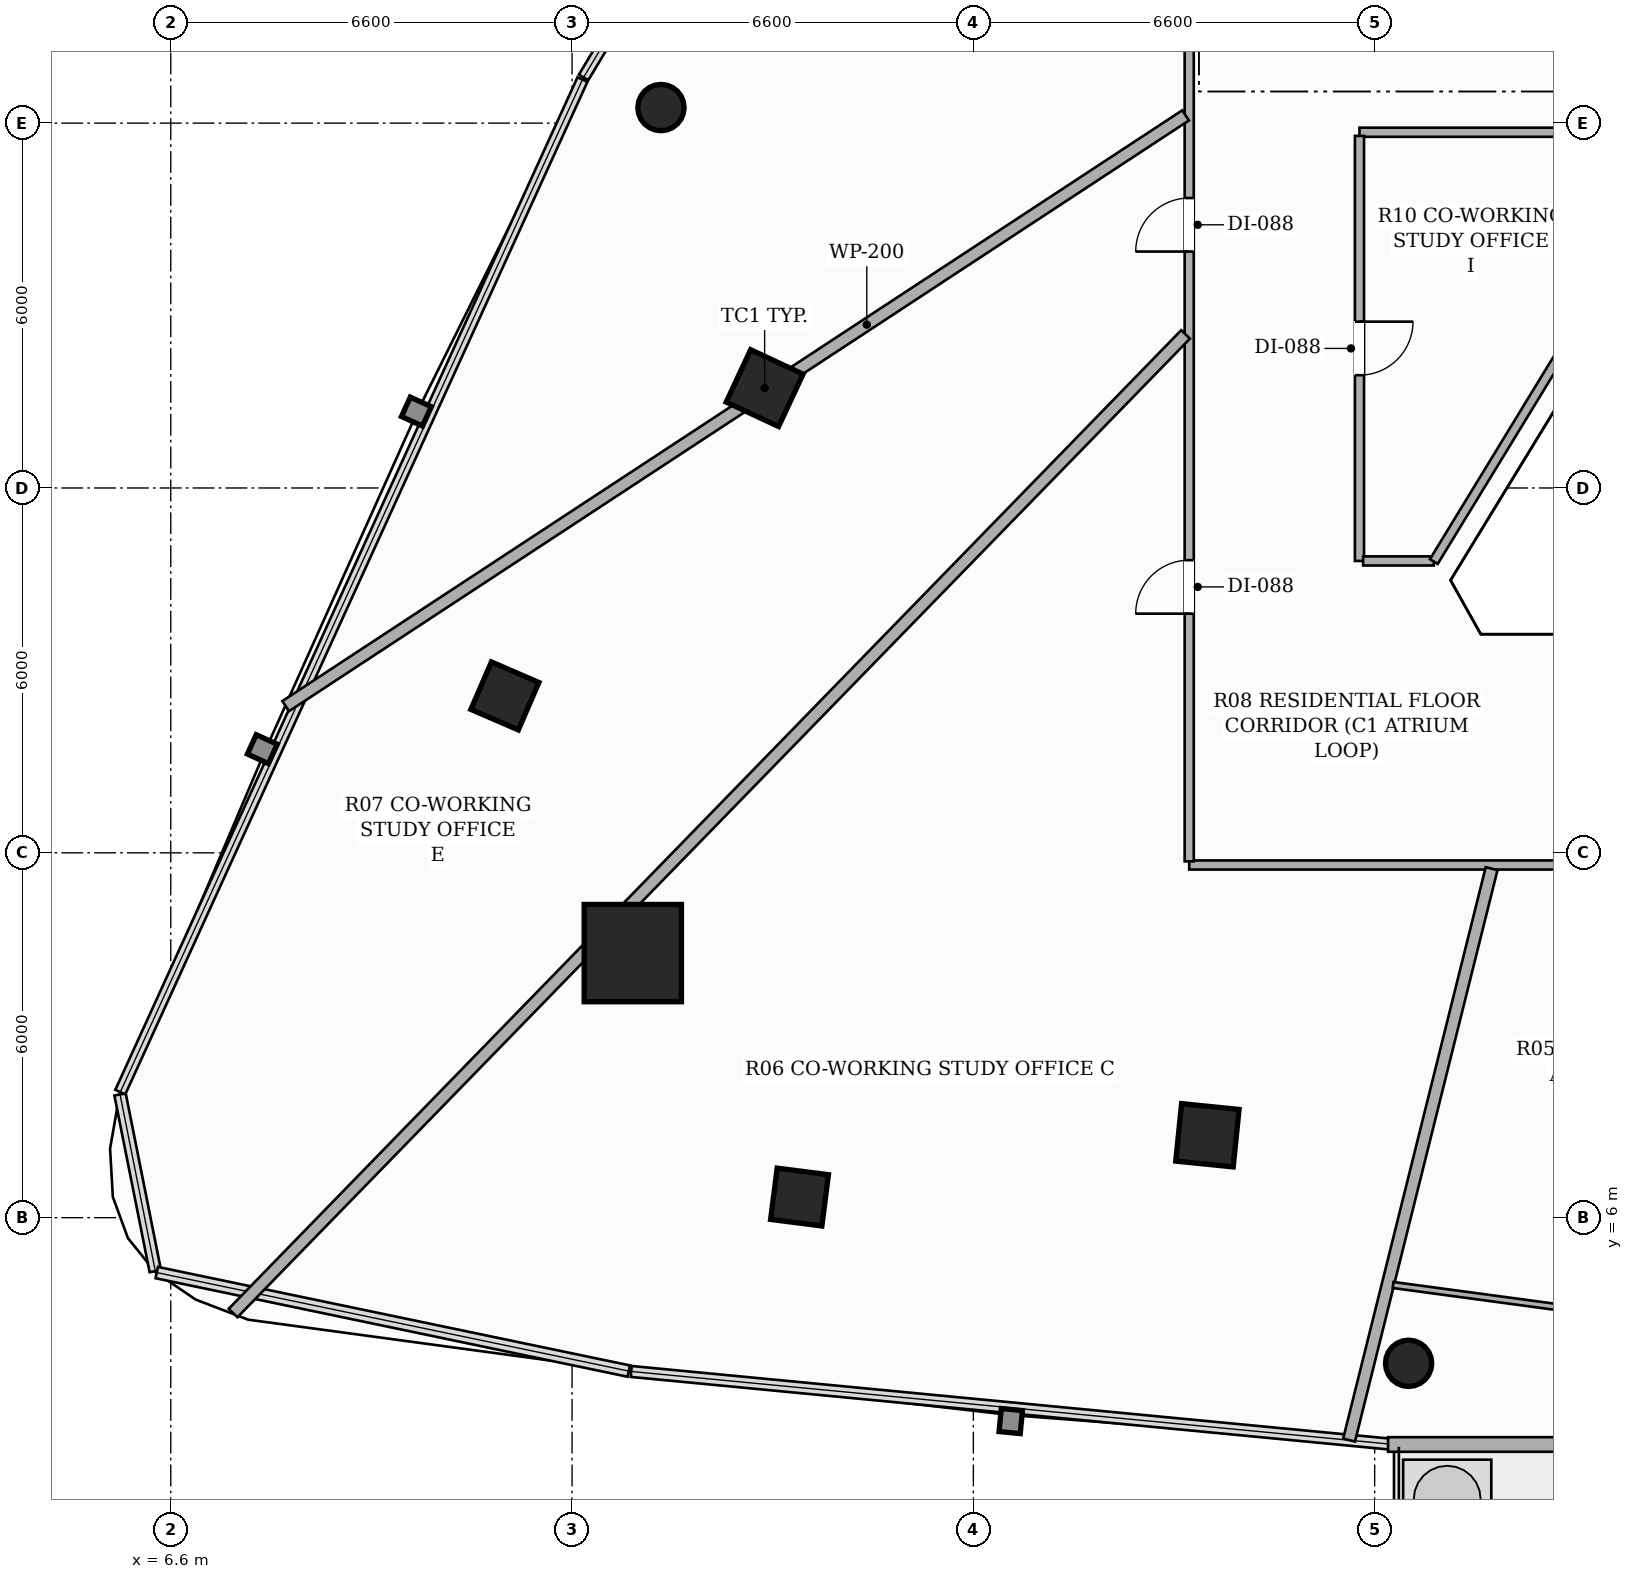
"""IFC4 building model, lengths in metres.
Left out: names, types, materials, properties, quantities, classifications, styles, units other than length and angle.
Written with IfcOpenShell. Run it as: python <this file> out.ifc"""

import sys

from ifc_helpers import new_model, si_unit, direction, frame, frame_2d, origin, origin_2d, place, context, subcontext, project, spatial, rectangle, hollow_rectangle, hollow_circle, extrude, element, fill, save


model = new_model("IFC4")
c1 = context("Model", 3, precision=1e-05, world=origin(), true_north=direction((0.0, 1.0)))
c2 = subcontext(c1, "Body", "Model", "MODEL_VIEW")
j1 = project(units=[si_unit("LENGTHUNIT", "METRE"), si_unit("PLANEANGLEUNIT", "RADIAN")], contexts=[c1])
p1 = place(None, origin())
s1 = spatial("IfcSite", under=j1, at=p1, CompositionType="ELEMENT")
p2 = place(p1, origin())
s2 = spatial("IfcBuilding", under=s1, at=p2, CompositionType="ELEMENT")
p3 = place(p2, frame((0.0, 0.0, 87.35)))
s3 = spatial("IfcBuildingStorey", under=s2, at=p3, CompositionType="ELEMENT", Elevation=87.35)
p4 = place(p3, frame((14.199, 10.351, 0.0), z_axis=(0.0, 0.0, 1.0), x_axis=(1.0, 0.0, 0.0)))
e1 = element("IfcColumn", 1, at=p4, inside=s3, PredefinedType="COLUMN", context=c2, shape_type="SweptSolid", body=[
    extrude(hollow_rectangle(XDim=1.6, YDim=1.6, WallThickness=0.05, at=origin_2d()), origin(), (0.0, 0.0, 1.0), 3.3),
])
for number, where, z_axis, x_axis in (
    (2, (16.367, 19.642, 0.0), (0.0, 0.0, 1.0), (0.423, 0.906, 0.0)),
    (3, (23.649, 7.355, 0.0), (0.0, 0.0, 1.0), (-0.995, 0.101, 0.0)),
):
    element("IfcColumn", number, at=place(p3, frame(where, z_axis=z_axis, x_axis=x_axis)), inside=s3, PredefinedType="COLUMN", context=c2, shape_type="SweptSolid", body=[
        extrude(hollow_rectangle(XDim=0.95, YDim=0.95, WallThickness=0.032, at=origin_2d()), origin(), (0.0, 0.0, 1.0), 3.3),
    ])
for number, where, z_axis, x_axis in (
    (4, (12.095, 14.58, 0.0), (0.0, 0.0, 1.0), (0.397, 0.918, 0.0)),
    (5, (16.941, 6.339, 0.0), (0.0, 0.0, 1.0), (-0.992, 0.127, 0.0)),
):
    element("IfcColumn", number, at=place(p3, frame(where, z_axis=z_axis, x_axis=x_axis)), inside=s3, PredefinedType="COLUMN", context=c2, shape_type="SweptSolid", body=[
        extrude(hollow_rectangle(XDim=0.85, YDim=0.85, WallThickness=0.028, at=origin_2d()), origin(), (0.0, 0.0, 1.0), 3.3),
    ])
for number, where, z_axis, x_axis in (
    (6, (14.662, 24.256, 0.0), (0.0, 0.0, 1.0), (1.0, 0.0, 0.0)),
    (7, (26.958, 3.605, 0.0), (0.0, 0.0, 1.0), (1.0, 0.0, 0.0)),
):
    element("IfcColumn", number, at=place(p3, frame(where, z_axis=z_axis, x_axis=x_axis)), inside=s3, PredefinedType="COLUMN", context=c2, shape_type="SweptSolid", body=[
        extrude(hollow_circle(Radius=0.381, WallThickness=0.022, at=origin_2d()), origin(), (0.0, 0.0, 1.0), 3.3),
    ])
p5 = place(p3, frame((26.62, 2.27, 0.0), z_axis=(0.0, 0.0, 1.0), x_axis=(1.0, 0.0, 0.0)))
e8 = element("IfcWall", 8, at=p5, inside=s3, PredefinedType="SOLIDWALL", context=c2, shape_type="SweptSolid", body=[
    extrude(rectangle(XDim=12.76, YDim=0.24, at=frame_2d((6.38, 0.0))), origin(), (0.0, 0.0, 1.0), 2.624),
])
p6 = place(p5, frame((10.263, 0.0, 0.0)))
e9 = element("IfcOpeningElement", 9, at=p6, cuts=e8, PredefinedType="OPENING", context=c2, shape_type="SweptSolid", body=[
    extrude(rectangle(XDim=1.8, YDim=2.2, at=frame_2d((0.9, 1.1))), frame((0.0, 0.13, 0.0), z_axis=(0.0, -1.0, 0.0), x_axis=(1.0, 0.0, 0.0)), (0.0, 0.0, 1.0), 0.26),
])
p7 = place(p3, frame((42.59, 11.8, 0.0), z_axis=(0.0, 0.0, 1.0), x_axis=(-1.0, 0.0, 0.0)))
e10 = element("IfcWall", 10, at=p7, inside=s3, PredefinedType="PARTITIONING", context=c2, shape_type="SweptSolid", body=[
    extrude(rectangle(XDim=19.24, YDim=0.15, at=frame_2d((9.62, 0.0))), origin(), (0.0, 0.0, 1.0), 2.669),
])
p8 = place(p7, frame((9.245, 0.0, 0.0)))
e11 = element("IfcOpeningElement", 11, at=p8, cuts=e10, PredefinedType="OPENING", context=c2, shape_type="SweptSolid", body=[
    extrude(rectangle(XDim=0.92, YDim=2.15, at=frame_2d((0.46, 1.075))), frame((0.0, 0.085, 0.0), z_axis=(0.0, -1.0, 0.0), x_axis=(1.0, 0.0, 0.0)), (0.0, 0.0, 1.0), 0.17),
])
p9 = place(p3, frame((23.35, 11.86, 0.0), z_axis=(0.0, 0.0, 1.0), x_axis=(0.0, 1.0, 0.0)))
e12 = element("IfcWall", 12, at=p9, inside=s3, PredefinedType="PARTITIONING", context=c2, shape_type="SweptSolid", body=[
    extrude(rectangle(XDim=25.04, YDim=0.15, at=frame_2d((12.52, 0.0))), origin(), (0.0, 0.0, 1.0), 2.413),
])
p10 = place(p9, frame((18.061, 0.0, 0.0)))
e13 = element("IfcOpeningElement", 13, at=p10, cuts=e12, PredefinedType="OPENING", context=c2, shape_type="SweptSolid", body=[
    extrude(rectangle(XDim=0.88, YDim=2.1, at=frame_2d((0.44, 1.05))), frame((0.0, 0.085, 0.0), z_axis=(0.0, -1.0, 0.0), x_axis=(1.0, 0.0, 0.0)), (0.0, 0.0, 1.0), 0.17),
])
p11 = place(p9, frame((4.073, 0.0, 0.0)))
e14 = element("IfcOpeningElement", 14, at=p11, cuts=e12, PredefinedType="OPENING", context=c2, shape_type="SweptSolid", body=[
    extrude(rectangle(XDim=0.88, YDim=2.1, at=frame_2d((0.44, 1.05))), frame((0.0, 0.085, 0.0), z_axis=(0.0, -1.0, 0.0), x_axis=(1.0, 0.0, 0.0)), (0.0, 0.0, 1.0), 0.17),
])
p12 = place(p9, frame((10.028, 0.0, 0.0)))
e15 = element("IfcOpeningElement", 15, at=p12, cuts=e12, PredefinedType="OPENING", context=c2, shape_type="SweptSolid", body=[
    extrude(rectangle(XDim=0.88, YDim=2.1, at=frame_2d((0.44, 1.05))), frame((0.0, 0.085, 0.0), z_axis=(0.0, -1.0, 0.0), x_axis=(1.0, 0.0, 0.0)), (0.0, 0.0, 1.0), 0.17),
])
p13 = place(p3, frame((31.683, 23.85, 0.0), z_axis=(0.0, 0.0, 1.0), x_axis=(-1.0, 0.0, 0.0)))
e16 = element("IfcWall", 16, at=p13, inside=s3, PredefinedType="PARTITIONING", context=c2, shape_type="SweptSolid", body=[
    extrude(rectangle(XDim=5.533, YDim=0.15, at=frame_2d((2.767, 0.0))), origin(), (0.0, 0.0, 1.0), 2.669),
])
p14 = place(p3, frame((26.15, 23.79, 0.0), z_axis=(0.0, 0.0, 1.0), x_axis=(0.0, -1.0, 0.0)))
e17 = element("IfcWall", 17, at=p14, inside=s3, PredefinedType="PARTITIONING", context=c2, shape_type="SweptSolid", body=[
    extrude(rectangle(XDim=6.99, YDim=0.15, at=frame_2d((3.495, 0.0))), origin(), (0.0, 0.0, 1.0), 2.669),
])
p15 = place(p14, frame((3.055, 0.0, 0.0)))
e18 = element("IfcOpeningElement", 18, at=p15, cuts=e17, PredefinedType="OPENING", context=c2, shape_type="SweptSolid", body=[
    extrude(rectangle(XDim=0.88, YDim=2.1, at=frame_2d((0.44, 1.05))), frame((0.0, 0.085, 0.0), z_axis=(0.0, -1.0, 0.0), x_axis=(1.0, 0.0, 0.0)), (0.0, 0.0, 1.0), 0.17),
])
p16 = place(p3, frame((26.21, 16.8, 0.0), z_axis=(0.0, 0.0, 1.0), x_axis=(1.0, 0.0, 0.0)))
e19 = element("IfcWall", 19, at=p16, inside=s3, PredefinedType="PARTITIONING", context=c2, shape_type="SweptSolid", body=[
    extrude(rectangle(XDim=1.163, YDim=0.15, at=frame_2d((0.582, 0.0))), origin(), (0.0, 0.0, 1.0), 3.06),
])
p17 = place(p3, frame((27.373, 16.79, 0.0), z_axis=(0.0, 0.0, 1.0), x_axis=(0.52102126657, 0.853543695297, 0.0)))
e20 = element("IfcWall", 20, at=p17, inside=s3, PredefinedType="PARTITIONING", context=c2, shape_type="SweptSolid", body=[
    extrude(rectangle(XDim=8.201, YDim=0.15, at=frame_2d((4.101, 0.0))), origin(), (0.0, 0.0, 1.0), 2.669),
])
p18 = place(p3, frame((23.29, 24.127, 0.0), z_axis=(0.0, 0.0, 1.0), x_axis=(-0.835988009382, -0.548747709034, 0.0)))
e21 = element("IfcWall", 21, at=p18, inside=s3, PredefinedType="PARTITIONING", context=c2, shape_type="SweptSolid", body=[
    extrude(rectangle(XDim=17.704, YDim=0.2, at=frame_2d((8.852, 0.0))), origin(), (0.0, 0.0, 1.0), 2.413),
])
p19 = place(p3, frame((7.625, 4.432, 0.0), z_axis=(0.0, 0.0, 1.0), x_axis=(0.697514321206, 0.716570842075, 0.0)))
e22 = element("IfcWall", 22, at=p19, inside=s3, PredefinedType="PARTITIONING", context=c2, shape_type="SweptSolid", body=[
    extrude(rectangle(XDim=22.458, YDim=0.2, at=frame_2d((11.229, 0.0))), origin(), (0.0, 0.0, 1.0), 2.413),
])
p20 = place(p3, frame((28.323, 11.74, 0.0), z_axis=(0.0, 0.0, 1.0), x_axis=(-0.242001816391, -0.970275796289, 0.0)))
e23 = element("IfcWall", 23, at=p20, inside=s3, PredefinedType="PARTITIONING", context=c2, shape_type="SweptSolid", body=[
    extrude(rectangle(XDim=9.686, YDim=0.2, at=frame_2d((4.843, 0.0))), origin(), (0.0, 0.0, 1.0), 2.413),
])
p21 = place(p3, frame((34.871, 3.793, 0.0), z_axis=(0.0, 0.0, 1.0), x_axis=(-0.991052148622, 0.133475236324, 0.0)))
e24 = element("IfcWall", 24, at=p21, inside=s3, PredefinedType="PARTITIONING", context=c2, shape_type="SweptSolid", body=[
    extrude(rectangle(XDim=8.242, YDim=0.1, at=frame_2d((4.121, 0.0))), origin(), (0.0, 0.0, 1.0), 2.413),
])
p22 = place(p21, frame((3.681, 0.0, 0.0)))
e25 = element("IfcOpeningElement", 25, at=p22, cuts=e24, PredefinedType="OPENING", context=c2, shape_type="SweptSolid", body=[
    extrude(rectangle(XDim=0.88, YDim=2.1, at=frame_2d((0.44, 1.05))), frame((0.0, 0.06, 0.0), z_axis=(0.0, -1.0, 0.0), x_axis=(1.0, 0.0, 0.0)), (0.0, 0.0, 1.0), 0.12),
])
p23 = place(p11, origin())
e26 = element("IfcDoor", 26, at=p23, inside=s3, OperationType="SINGLE_SWING_LEFT", PredefinedType="DOOR", context=c2, shape_type="SweptSolid", body=[
    extrude(rectangle(XDim=0.88, YDim=2.1, at=frame_2d((0.44, 1.05))), frame((0.0, 0.025, 0.0), z_axis=(0.0, -1.0, 0.0), x_axis=(1.0, 0.0, 0.0)), (0.0, 0.0, 1.0), 0.05),
])
fill(e14, e26)
p24 = place(p12, origin())
e27 = element("IfcDoor", 27, at=p24, inside=s3, OperationType="SINGLE_SWING_LEFT", PredefinedType="DOOR", context=c2, shape_type="SweptSolid", body=[
    extrude(rectangle(XDim=0.88, YDim=2.1, at=frame_2d((0.44, 1.05))), frame((0.0, 0.025, 0.0), z_axis=(0.0, -1.0, 0.0), x_axis=(1.0, 0.0, 0.0)), (0.0, 0.0, 1.0), 0.05),
])
fill(e15, e27)
p25 = place(p15, origin())
e28 = element("IfcDoor", 28, at=p25, inside=s3, OperationType="SINGLE_SWING_LEFT", PredefinedType="DOOR", context=c2, shape_type="SweptSolid", body=[
    extrude(rectangle(XDim=0.88, YDim=2.1, at=frame_2d((0.44, 1.05))), frame((0.0, 0.025, 0.0), z_axis=(0.0, -1.0, 0.0), x_axis=(1.0, 0.0, 0.0)), (0.0, 0.0, 1.0), 0.05),
])
fill(e18, e28)
save(model, sys.argv[1])
